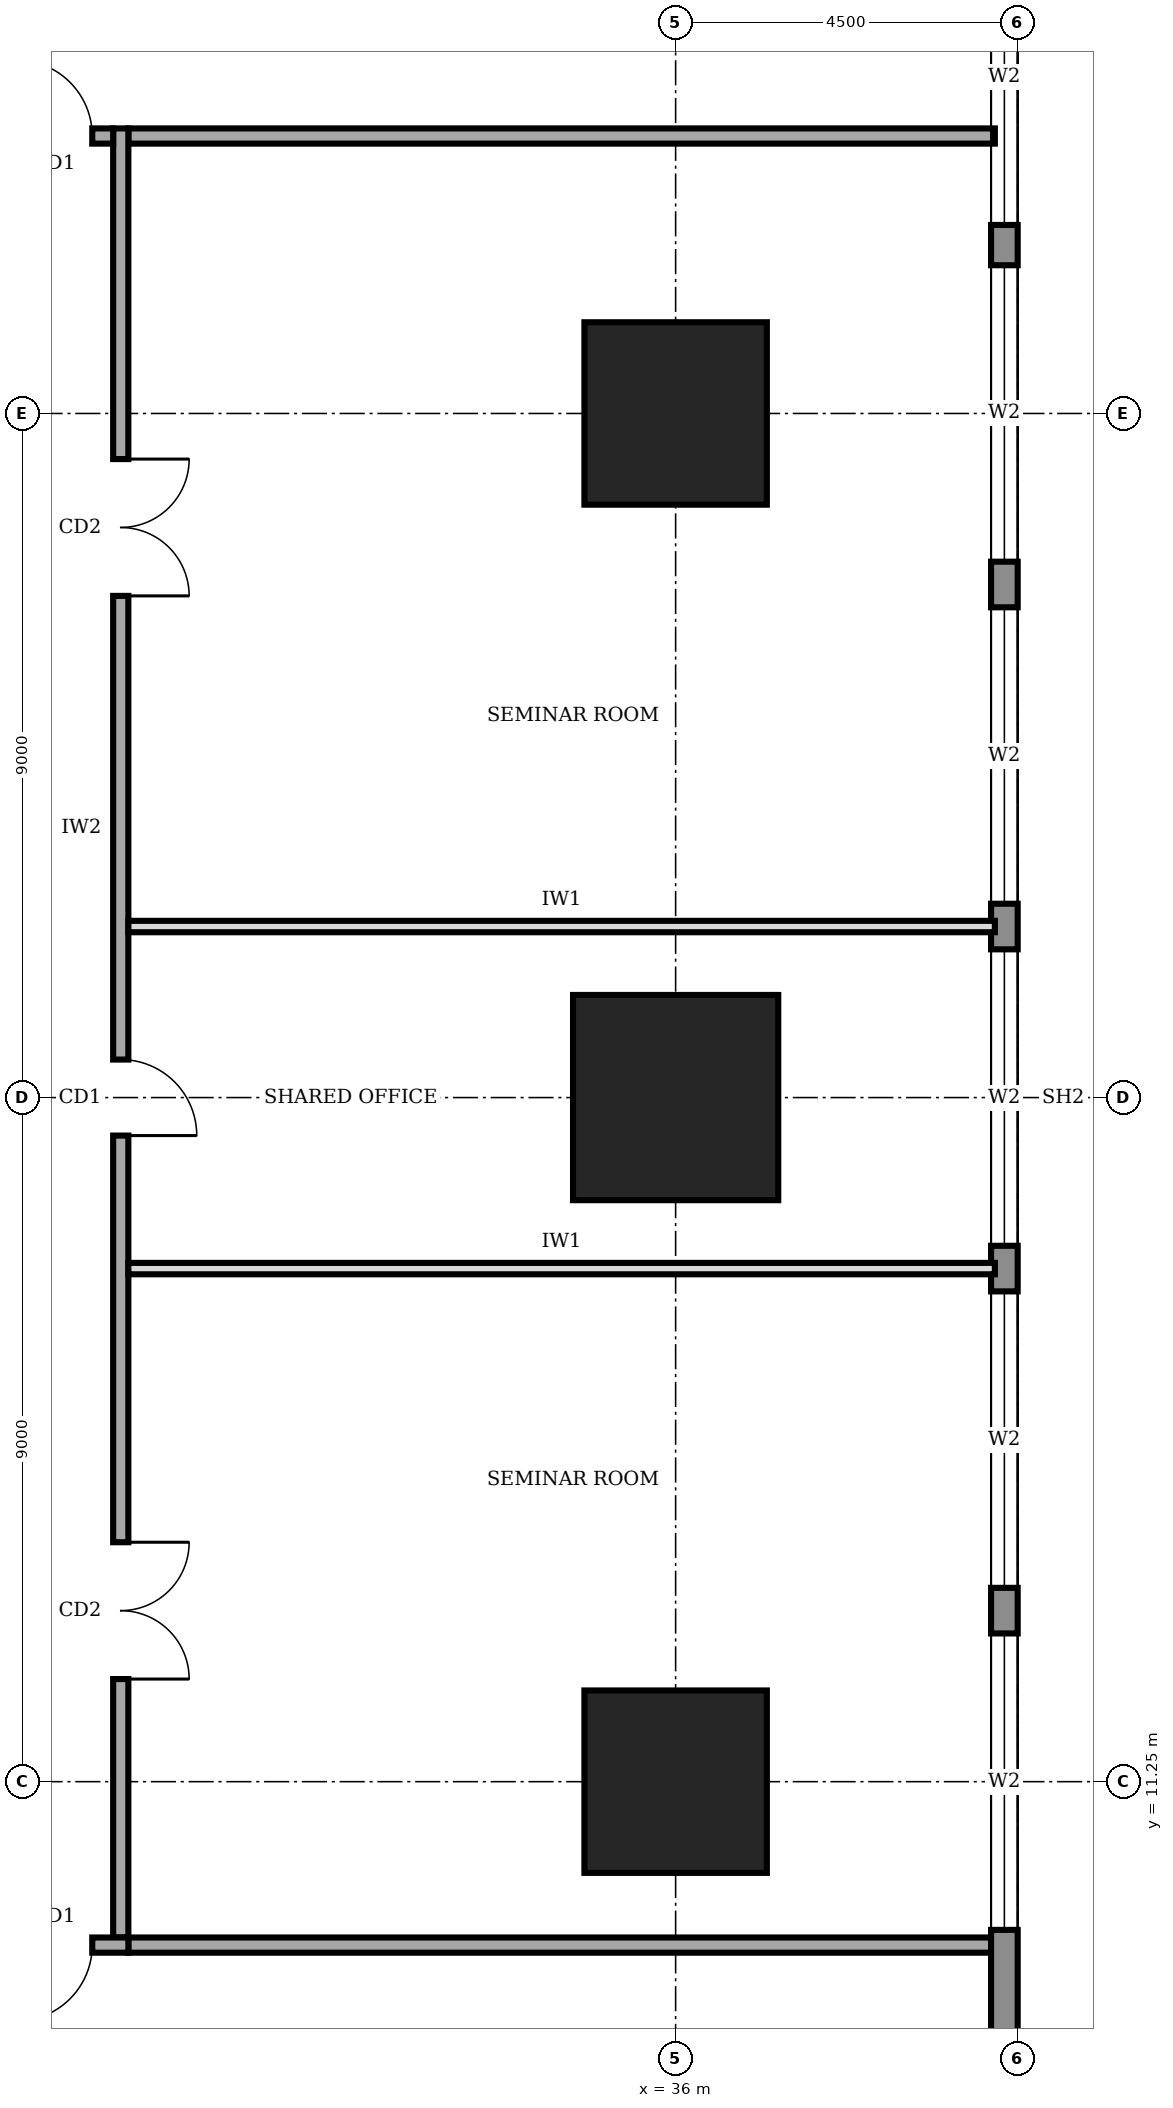
"""IFC4 building model, lengths in metres.
Left out: names, types, materials, properties, quantities, classifications, styles, units other than length and angle.
Written with IfcOpenShell. Run it as: python <this file> out.ifc"""

import sys

from ifc_helpers import new_model, si_unit, direction, frame, frame_2d, origin, origin_2d, place, context, subcontext, project, spatial, rectangle, extrude, element, fill, save


model = new_model("IFC4")
c1 = context("Model", 3, precision=1e-05, world=origin(), true_north=direction((0.0, 1.0)))
c2 = subcontext(c1, "Body", "Model", "MODEL_VIEW")
j1 = project(units=[si_unit("LENGTHUNIT", "METRE"), si_unit("PLANEANGLEUNIT", "RADIAN")], contexts=[c1])
p1 = place(None, origin())
s1 = spatial("IfcSite", under=j1, at=p1, CompositionType="ELEMENT")
p2 = place(p1, origin())
s2 = spatial("IfcBuilding", under=s1, at=p2, CompositionType="ELEMENT")
p3 = place(p2, frame((0.0, 0.0, 53.0)))
s3 = spatial("IfcBuildingStorey", under=s2, at=p3, CompositionType="ELEMENT", Elevation=53.0)
p4 = place(p3, frame((36.0, 11.25, 0.0), z_axis=(0.0, 0.0, 1.0), x_axis=(1.0, 0.0, 0.0)))
e1 = element("IfcColumn", 1, at=p4, inside=s3, PredefinedType="COLUMN", context=c2, shape_type="SweptSolid", body=[
    extrude(rectangle(XDim=2.4, YDim=2.4, at=origin_2d()), origin(), (0.0, 0.0, 1.0), 4.0),
])
p5 = place(p3, frame((36.0, 20.25, 0.0), z_axis=(0.0, 0.0, 1.0), x_axis=(1.0, 0.0, 0.0)))
e2 = element("IfcColumn", 2, at=p5, inside=s3, PredefinedType="COLUMN", context=c2, shape_type="SweptSolid", body=[
    extrude(rectangle(XDim=2.7, YDim=2.7, at=origin_2d()), origin(), (0.0, 0.0, 1.0), 4.0),
])
p6 = place(p3, frame((36.0, 29.25, 0.0), z_axis=(0.0, 0.0, 1.0), x_axis=(1.0, 0.0, 0.0)))
e3 = element("IfcColumn", 3, at=p6, inside=s3, PredefinedType="COLUMN", context=c2, shape_type="SweptSolid", body=[
    extrude(rectangle(XDim=2.4, YDim=2.4, at=origin_2d()), origin(), (0.0, 0.0, 1.0), 4.0),
])
p7 = place(p3, frame((40.325, 4.52, 0.0), z_axis=(0.0, 0.0, 1.0), x_axis=(0.0, 1.0, 0.0)))
e4 = element("IfcWall", 4, at=p7, inside=s3, PredefinedType="STANDARD", context=c2, shape_type="SweptSolid", body=[
    extrude(rectangle(XDim=31.46, YDim=0.35, at=frame_2d((15.73, 0.0))), origin(), (0.0, 0.0, 1.0), 3.75),
])
p8 = place(p7, frame((4.78, 0.0, 0.6)))
e5 = element("IfcOpeningElement", 5, at=p8, cuts=e4, PredefinedType="OPENING", context=c2, shape_type="SweptSolid", body=[
    extrude(rectangle(XDim=3.9, YDim=2.6, at=frame_2d((1.95, 1.3))), frame((0.0, 0.185, 0.0), z_axis=(0.0, -1.0, 0.0), x_axis=(1.0, 0.0, 0.0)), (0.0, 0.0, 1.0), 0.37),
])
p9 = place(p7, frame((9.28, 0.0, 0.6)))
e6 = element("IfcOpeningElement", 6, at=p9, cuts=e4, PredefinedType="OPENING", context=c2, shape_type="SweptSolid", body=[
    extrude(rectangle(XDim=3.9, YDim=2.6, at=frame_2d((1.95, 1.3))), frame((0.0, 0.185, 0.0), z_axis=(0.0, -1.0, 0.0), x_axis=(1.0, 0.0, 0.0)), (0.0, 0.0, 1.0), 0.37),
])
p10 = place(p7, frame((13.78, 0.0, 0.6)))
e7 = element("IfcOpeningElement", 7, at=p10, cuts=e4, PredefinedType="OPENING", context=c2, shape_type="SweptSolid", body=[
    extrude(rectangle(XDim=3.9, YDim=2.6, at=frame_2d((1.95, 1.3))), frame((0.0, 0.185, 0.0), z_axis=(0.0, -1.0, 0.0), x_axis=(1.0, 0.0, 0.0)), (0.0, 0.0, 1.0), 0.37),
])
p11 = place(p7, frame((18.28, 0.0, 0.6)))
e8 = element("IfcOpeningElement", 8, at=p11, cuts=e4, PredefinedType="OPENING", context=c2, shape_type="SweptSolid", body=[
    extrude(rectangle(XDim=3.9, YDim=2.6, at=frame_2d((1.95, 1.3))), frame((0.0, 0.185, 0.0), z_axis=(0.0, -1.0, 0.0), x_axis=(1.0, 0.0, 0.0)), (0.0, 0.0, 1.0), 0.37),
])
p12 = place(p7, frame((22.78, 0.0, 0.6)))
e9 = element("IfcOpeningElement", 9, at=p12, cuts=e4, PredefinedType="OPENING", context=c2, shape_type="SweptSolid", body=[
    extrude(rectangle(XDim=3.9, YDim=2.6, at=frame_2d((1.95, 1.3))), frame((0.0, 0.185, 0.0), z_axis=(0.0, -1.0, 0.0), x_axis=(1.0, 0.0, 0.0)), (0.0, 0.0, 1.0), 0.37),
])
p13 = place(p7, frame((27.21, 0.0, 0.6)))
e10 = element("IfcOpeningElement", 10, at=p13, cuts=e4, PredefinedType="OPENING", context=c2, shape_type="SweptSolid", body=[
    extrude(rectangle(XDim=3.9, YDim=2.6, at=frame_2d((1.95, 1.3))), frame((0.0, 0.185, 0.0), z_axis=(0.0, -1.0, 0.0), x_axis=(1.0, 0.0, 0.0)), (0.0, 0.0, 1.0), 0.37),
])
p14 = place(p3, frame((11.9, 9.1, 0.0), z_axis=(0.0, 0.0, 1.0), x_axis=(1.0, 0.0, 0.0)))
e11 = element("IfcWall", 11, at=p14, inside=s3, PredefinedType="SOLIDWALL", context=c2, shape_type="SweptSolid", body=[
    extrude(rectangle(XDim=16.9, YDim=0.2, at=frame_2d((8.45, 0.0))), origin(), (0.0, 0.0, 1.0), 3.75),
])
p15 = place(p14, frame((0.275, 0.0, 0.0)))
e12 = element("IfcOpeningElement", 12, at=p15, cuts=e11, PredefinedType="OPENING", context=c2, shape_type="SweptSolid", body=[
    extrude(rectangle(XDim=1.0, YDim=2.1, at=frame_2d((0.5, 1.05))), frame((0.0, 0.11, 0.0), z_axis=(0.0, -1.0, 0.0), x_axis=(1.0, 0.0, 0.0)), (0.0, 0.0, 1.0), 0.22),
])
p16 = place(p14, frame((7.45, 0.0, 0.0)))
e13 = element("IfcOpeningElement", 13, at=p16, cuts=e11, PredefinedType="OPENING", context=c2, shape_type="SweptSolid", body=[
    extrude(rectangle(XDim=1.8, YDim=2.1, at=frame_2d((0.9, 1.05))), frame((0.0, 0.11, 0.0), z_axis=(0.0, -1.0, 0.0), x_axis=(1.0, 0.0, 0.0)), (0.0, 0.0, 1.0), 0.22),
])
p17 = place(p14, frame((15.425, 0.0, 0.0)))
e14 = element("IfcOpeningElement", 14, at=p17, cuts=e11, PredefinedType="OPENING", context=c2, shape_type="SweptSolid", body=[
    extrude(rectangle(XDim=1.0, YDim=2.1, at=frame_2d((0.5, 1.05))), frame((0.0, 0.11, 0.0), z_axis=(0.0, -1.0, 0.0), x_axis=(1.0, 0.0, 0.0)), (0.0, 0.0, 1.0), 0.22),
])
p18 = place(p3, frame((28.7, 9.2, 0.0), z_axis=(0.0, 0.0, 1.0), x_axis=(0.0, 1.0, 0.0)))
e15 = element("IfcWall", 15, at=p18, inside=s3, PredefinedType="SOLIDWALL", context=c2, shape_type="SweptSolid", body=[
    extrude(rectangle(XDim=23.8, YDim=0.2, at=frame_2d((11.9, 0.0))), origin(), (0.0, 0.0, 1.0), 3.75),
])
p19 = place(p18, frame((3.4, 0.0, 0.0)))
e16 = element("IfcOpeningElement", 16, at=p19, cuts=e15, PredefinedType="OPENING", context=c2, shape_type="SweptSolid", body=[
    extrude(rectangle(XDim=1.8, YDim=2.1, at=frame_2d((0.9, 1.05))), frame((0.0, 0.11, 0.0), z_axis=(0.0, -1.0, 0.0), x_axis=(1.0, 0.0, 0.0)), (0.0, 0.0, 1.0), 0.22),
])
p20 = place(p18, frame((10.55, 0.0, 0.0)))
e17 = element("IfcOpeningElement", 17, at=p20, cuts=e15, PredefinedType="OPENING", context=c2, shape_type="SweptSolid", body=[
    extrude(rectangle(XDim=1.0, YDim=2.1, at=frame_2d((0.5, 1.05))), frame((0.0, 0.11, 0.0), z_axis=(0.0, -1.0, 0.0), x_axis=(1.0, 0.0, 0.0)), (0.0, 0.0, 1.0), 0.22),
])
p21 = place(p18, frame((17.65, 0.0, 0.0)))
e18 = element("IfcOpeningElement", 18, at=p21, cuts=e15, PredefinedType="OPENING", context=c2, shape_type="SweptSolid", body=[
    extrude(rectangle(XDim=1.8, YDim=2.1, at=frame_2d((0.9, 1.05))), frame((0.0, 0.11, 0.0), z_axis=(0.0, -1.0, 0.0), x_axis=(1.0, 0.0, 0.0)), (0.0, 0.0, 1.0), 0.22),
])
p22 = place(p3, frame((28.6, 32.9, 0.0), z_axis=(0.0, 0.0, 1.0), x_axis=(-1.0, 0.0, 0.0)))
e19 = element("IfcWall", 19, at=p22, inside=s3, PredefinedType="SOLIDWALL", context=c2, shape_type="SweptSolid", body=[
    extrude(rectangle(XDim=16.9, YDim=0.2, at=frame_2d((8.45, 0.0))), origin(), (0.0, 0.0, 1.0), 3.75),
])
p23 = place(p22, frame((15.425, 0.0, 0.0)))
e20 = element("IfcOpeningElement", 20, at=p23, cuts=e19, PredefinedType="OPENING", context=c2, shape_type="SweptSolid", body=[
    extrude(rectangle(XDim=1.0, YDim=2.1, at=frame_2d((0.5, 1.05))), frame((0.0, 0.11, 0.0), z_axis=(0.0, -1.0, 0.0), x_axis=(1.0, 0.0, 0.0)), (0.0, 0.0, 1.0), 0.22),
])
p24 = place(p22, frame((12.35, 0.0, 0.0)))
e21 = element("IfcOpeningElement", 21, at=p24, cuts=e19, PredefinedType="OPENING", context=c2, shape_type="SweptSolid", body=[
    extrude(rectangle(XDim=1.0, YDim=2.1, at=frame_2d((0.5, 1.05))), frame((0.0, 0.11, 0.0), z_axis=(0.0, -1.0, 0.0), x_axis=(1.0, 0.0, 0.0)), (0.0, 0.0, 1.0), 0.22),
])
p25 = place(p22, frame((5.6, 0.0, 0.0)))
e22 = element("IfcOpeningElement", 22, at=p25, cuts=e19, PredefinedType="OPENING", context=c2, shape_type="SweptSolid", body=[
    extrude(rectangle(XDim=1.0, YDim=2.1, at=frame_2d((0.5, 1.05))), frame((0.0, 0.11, 0.0), z_axis=(0.0, -1.0, 0.0), x_axis=(1.0, 0.0, 0.0)), (0.0, 0.0, 1.0), 0.22),
])
p26 = place(p22, frame((0.275, 0.0, 0.0)))
e23 = element("IfcOpeningElement", 23, at=p26, cuts=e19, PredefinedType="OPENING", context=c2, shape_type="SweptSolid", body=[
    extrude(rectangle(XDim=1.0, YDim=2.1, at=frame_2d((0.5, 1.05))), frame((0.0, 0.11, 0.0), z_axis=(0.0, -1.0, 0.0), x_axis=(1.0, 0.0, 0.0)), (0.0, 0.0, 1.0), 0.22),
])
for number, where, z_axis, x_axis in (
    (24, (28.8, 9.1, 0.0), (0.0, 0.0, 1.0), (1.0, 0.0, 0.0)),
    (25, (28.8, 32.9, 0.0), (0.0, 0.0, 1.0), (1.0, 0.0, 0.0)),
):
    element("IfcWall", number, at=place(p3, frame(where, z_axis=z_axis, x_axis=x_axis)), inside=s3, PredefinedType="SOLIDWALL", context=c2, shape_type="SweptSolid", body=[
        extrude(rectangle(XDim=11.4, YDim=0.2, at=frame_2d((5.7, 0.0))), origin(), (0.0, 0.0, 1.0), 3.75),
    ])
for number, where, z_axis, x_axis in (
    (26, (28.8, 18.0, 0.0), (0.0, 0.0, 1.0), (1.0, 0.0, 0.0)),
    (27, (28.8, 22.5, 0.0), (0.0, 0.0, 1.0), (1.0, 0.0, 0.0)),
):
    element("IfcWall", number, at=place(p3, frame(where, z_axis=z_axis, x_axis=x_axis)), inside=s3, PredefinedType="PARTITIONING", context=c2, shape_type="SweptSolid", body=[
        extrude(rectangle(XDim=11.4, YDim=0.15, at=frame_2d((5.7, 0.0))), origin(), (0.0, 0.0, 1.0), 3.75),
    ])
p27 = place(p8, origin())
e28 = element("IfcWindow", 28, at=p27, inside=s3, PartitioningType="SINGLE_PANEL", PredefinedType="WINDOW", context=c2, shape_type="SweptSolid", body=[
    extrude(rectangle(XDim=3.9, YDim=2.6, at=frame_2d((1.95, 1.3))), frame((0.0, 0.03, 0.0), z_axis=(0.0, -1.0, 0.0), x_axis=(1.0, 0.0, 0.0)), (0.0, 0.0, 1.0), 0.06),
])
fill(e5, e28)
p28 = place(p9, origin())
e29 = element("IfcWindow", 29, at=p28, inside=s3, PartitioningType="SINGLE_PANEL", PredefinedType="WINDOW", context=c2, shape_type="SweptSolid", body=[
    extrude(rectangle(XDim=3.9, YDim=2.6, at=frame_2d((1.95, 1.3))), frame((0.0, 0.03, 0.0), z_axis=(0.0, -1.0, 0.0), x_axis=(1.0, 0.0, 0.0)), (0.0, 0.0, 1.0), 0.06),
])
fill(e6, e29)
p29 = place(p10, origin())
e30 = element("IfcWindow", 30, at=p29, inside=s3, PartitioningType="SINGLE_PANEL", PredefinedType="WINDOW", context=c2, shape_type="SweptSolid", body=[
    extrude(rectangle(XDim=3.9, YDim=2.6, at=frame_2d((1.95, 1.3))), frame((0.0, 0.03, 0.0), z_axis=(0.0, -1.0, 0.0), x_axis=(1.0, 0.0, 0.0)), (0.0, 0.0, 1.0), 0.06),
])
fill(e7, e30)
p30 = place(p11, origin())
e31 = element("IfcWindow", 31, at=p30, inside=s3, PartitioningType="SINGLE_PANEL", PredefinedType="WINDOW", context=c2, shape_type="SweptSolid", body=[
    extrude(rectangle(XDim=3.9, YDim=2.6, at=frame_2d((1.95, 1.3))), frame((0.0, 0.03, 0.0), z_axis=(0.0, -1.0, 0.0), x_axis=(1.0, 0.0, 0.0)), (0.0, 0.0, 1.0), 0.06),
])
fill(e8, e31)
p31 = place(p12, origin())
e32 = element("IfcWindow", 32, at=p31, inside=s3, PartitioningType="SINGLE_PANEL", PredefinedType="WINDOW", context=c2, shape_type="SweptSolid", body=[
    extrude(rectangle(XDim=3.9, YDim=2.6, at=frame_2d((1.95, 1.3))), frame((0.0, 0.03, 0.0), z_axis=(0.0, -1.0, 0.0), x_axis=(1.0, 0.0, 0.0)), (0.0, 0.0, 1.0), 0.06),
])
fill(e9, e32)
p32 = place(p13, origin())
e33 = element("IfcWindow", 33, at=p32, inside=s3, PartitioningType="SINGLE_PANEL", PredefinedType="WINDOW", context=c2, shape_type="SweptSolid", body=[
    extrude(rectangle(XDim=3.9, YDim=2.6, at=frame_2d((1.95, 1.3))), frame((0.0, 0.03, 0.0), z_axis=(0.0, -1.0, 0.0), x_axis=(1.0, 0.0, 0.0)), (0.0, 0.0, 1.0), 0.06),
])
fill(e10, e33)
p33 = place(p17, frame((1.0, 0.0, 0.0), z_axis=(0.0, 0.0, 1.0), x_axis=(-1.0, 0.0, 0.0)))
e34 = element("IfcDoor", 34, at=p33, inside=s3, OperationType="SINGLE_SWING_RIGHT", PredefinedType="DOOR", context=c2, shape_type="SweptSolid", body=[
    extrude(rectangle(XDim=1.0, YDim=2.1, at=frame_2d((0.5, 1.05))), frame((0.0, 0.025, 0.0), z_axis=(0.0, -1.0, 0.0), x_axis=(1.0, 0.0, 0.0)), (0.0, 0.0, 1.0), 0.05),
])
fill(e14, e34)
p34 = place(p19, frame((1.8, 0.0, 0.0), z_axis=(0.0, 0.0, 1.0), x_axis=(-1.0, 0.0, 0.0)))
e35 = element("IfcDoor", 35, at=p34, inside=s3, OperationType="DOUBLE_DOOR_SINGLE_SWING", PredefinedType="DOOR", context=c2, shape_type="SweptSolid", body=[
    extrude(rectangle(XDim=1.8, YDim=2.1, at=frame_2d((0.9, 1.05))), frame((0.0, 0.025, 0.0), z_axis=(0.0, -1.0, 0.0), x_axis=(1.0, 0.0, 0.0)), (0.0, 0.0, 1.0), 0.05),
])
fill(e16, e35)
p35 = place(p20, frame((1.0, 0.0, 0.0), z_axis=(0.0, 0.0, 1.0), x_axis=(-1.0, 0.0, 0.0)))
e36 = element("IfcDoor", 36, at=p35, inside=s3, OperationType="SINGLE_SWING_RIGHT", PredefinedType="DOOR", context=c2, shape_type="SweptSolid", body=[
    extrude(rectangle(XDim=1.0, YDim=2.1, at=frame_2d((0.5, 1.05))), frame((0.0, 0.025, 0.0), z_axis=(0.0, -1.0, 0.0), x_axis=(1.0, 0.0, 0.0)), (0.0, 0.0, 1.0), 0.05),
])
fill(e17, e36)
p36 = place(p21, frame((1.8, 0.0, 0.0), z_axis=(0.0, 0.0, 1.0), x_axis=(-1.0, 0.0, 0.0)))
e37 = element("IfcDoor", 37, at=p36, inside=s3, OperationType="DOUBLE_DOOR_SINGLE_SWING", PredefinedType="DOOR", context=c2, shape_type="SweptSolid", body=[
    extrude(rectangle(XDim=1.8, YDim=2.1, at=frame_2d((0.9, 1.05))), frame((0.0, 0.025, 0.0), z_axis=(0.0, -1.0, 0.0), x_axis=(1.0, 0.0, 0.0)), (0.0, 0.0, 1.0), 0.05),
])
fill(e18, e37)
p37 = place(p26, frame((1.0, 0.0, 0.0), z_axis=(0.0, 0.0, 1.0), x_axis=(-1.0, 0.0, 0.0)))
e38 = element("IfcDoor", 38, at=p37, inside=s3, OperationType="SINGLE_SWING_LEFT", PredefinedType="DOOR", context=c2, shape_type="SweptSolid", body=[
    extrude(rectangle(XDim=1.0, YDim=2.1, at=frame_2d((0.5, 1.05))), frame((0.0, 0.025, 0.0), z_axis=(0.0, -1.0, 0.0), x_axis=(1.0, 0.0, 0.0)), (0.0, 0.0, 1.0), 0.05),
])
fill(e23, e38)
save(model, sys.argv[1])
